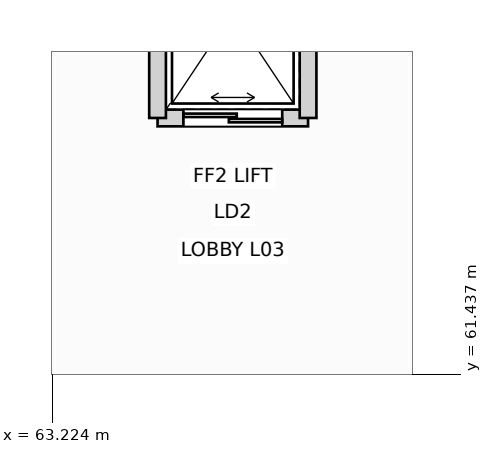
"""IFC4 building model, lengths in metres.
Left out: names, types, materials, properties, quantities, classifications, styles, units other than length and angle.
Written with IfcOpenShell. Run it as: python <this file> out.ifc"""

import sys

from ifc_helpers import new_model, si_unit, direction, frame, frame_2d, origin, place, context, subcontext, project, spatial, rectangle, extrude, element, fill, save


model = new_model("IFC4")
c1 = context("Model", 3, precision=1e-05, world=origin(), true_north=direction((0.0, 1.0)))
c2 = subcontext(c1, "Body", "Model", "MODEL_VIEW")
j1 = project(units=[si_unit("LENGTHUNIT", "METRE"), si_unit("PLANEANGLEUNIT", "RADIAN")], contexts=[c1])
p1 = place(None, origin())
s1 = spatial("IfcSite", under=j1, at=p1, CompositionType="ELEMENT")
p2 = place(p1, origin())
s2 = spatial("IfcBuilding", under=s1, at=p2, CompositionType="ELEMENT")
p3 = place(p2, frame((0.0, 0.0, 16.8)))
s3 = spatial("IfcBuildingStorey", under=s2, at=p3, CompositionType="ELEMENT", Elevation=16.8)
p4 = place(p3, frame((64.61, 64.81, 0.0), z_axis=(0.0, 0.0, 1.0), x_axis=(1.0, 0.0, 0.0)))
e1 = element("IfcWall", 1, at=p4, inside=s3, PredefinedType="PARTITIONING", context=c2, shape_type="SweptSolid", body=[
    extrude(rectangle(XDim=1.98, YDim=0.22, at=frame_2d((0.99, 0.0))), origin(), (0.0, 0.0, 1.0), 4.485),
])
p5 = place(p4, frame((0.34, 0.0, 0.0)))
e2 = element("IfcOpeningElement", 2, at=p5, cuts=e1, PredefinedType="OPENING", context=c2, shape_type="SweptSolid", body=[
    extrude(rectangle(XDim=1.3, YDim=2.2, at=frame_2d((0.65, 1.1))), frame((0.0, 0.12, 0.0), z_axis=(0.0, -1.0, 0.0), x_axis=(1.0, 0.0, 0.0)), (0.0, 0.0, 1.0), 0.24),
])
for number, where, z_axis, x_axis in (
    (3, (64.61, 64.81, 0.0), (0.0, 0.0, 1.0), (0.0, 1.0, 0.0)),
    (4, (66.59, 64.81, 0.0), (0.0, 0.0, 1.0), (0.0, 1.0, 0.0)),
):
    element("IfcWall", number, at=place(p3, frame(where, z_axis=z_axis, x_axis=x_axis)), inside=s3, PredefinedType="PARTITIONING", context=c2, shape_type="SweptSolid", body=[
        extrude(rectangle(XDim=2.78, YDim=0.22, at=frame_2d((1.39, 0.0))), origin(), (0.0, 0.0, 1.0), 4.125),
    ])
p6 = place(p5, origin())
e5 = element("IfcDoor", 5, at=p6, inside=s3, OperationType="DOUBLE_DOOR_SLIDING", PredefinedType="DOOR", context=c2, shape_type="SweptSolid", body=[
    extrude(rectangle(XDim=1.3, YDim=2.2, at=frame_2d((0.65, 1.1))), frame((0.0, 0.025, 0.0), z_axis=(0.0, -1.0, 0.0), x_axis=(1.0, 0.0, 0.0)), (0.0, 0.0, 1.0), 0.05),
])
fill(e2, e5)
save(model, sys.argv[1])
